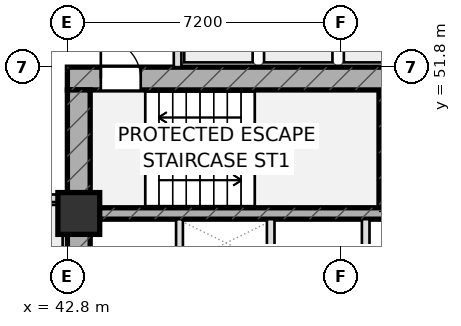
"""IFC4 building model, lengths in metres.
Left out: names, types, materials, properties, quantities, classifications, styles, units other than length and angle.
Written with IfcOpenShell. Run it as: python <this file> out.ifc"""

import sys

from ifc_helpers import new_model, si_unit, direction, frame, frame_2d, origin, origin_2d, place, context, subcontext, project, spatial, rectangle, extrude, element, fill, save


model = new_model("IFC4")
c1 = context("Model", 3, precision=1e-05, world=origin(), true_north=direction((0.0, 1.0)))
c2 = subcontext(c1, "Body", "Model", "MODEL_VIEW")
j1 = project(units=[si_unit("LENGTHUNIT", "METRE"), si_unit("PLANEANGLEUNIT", "RADIAN")], contexts=[c1])
p1 = place(None, origin())
s1 = spatial("IfcSite", under=j1, at=p1, CompositionType="ELEMENT")
p2 = place(p1, origin())
s2 = spatial("IfcBuilding", under=s1, at=p2, CompositionType="ELEMENT")
p3 = place(p2, origin())
s3 = spatial("IfcBuildingStorey", under=s2, at=p3, CompositionType="ELEMENT", Elevation=0.0)
p4 = place(p3, frame((51.11, 48.1, 0.0), z_axis=(0.0, 0.0, 1.0), x_axis=(0.0, 1.0, 0.0)))
e1 = element("IfcWall", 1, at=p4, inside=s3, PredefinedType="SHEAR", context=c2, shape_type="SweptSolid", body=[
    extrude(rectangle(XDim=3.1, YDim=0.22, at=frame_2d((1.55, 0.0))), origin(), (0.0, 0.0, 1.0), 5.45),
])
p5 = place(p3, frame((42.8, 51.5, 0.0), z_axis=(0.0, 0.0, 1.0), x_axis=(1.0, 0.0, 0.0)))
e2 = element("IfcWall", 2, at=p5, inside=s3, PredefinedType="SHEAR", context=c2, shape_type="SweptSolid", body=[
    extrude(rectangle(XDim=14.4, YDim=0.6, at=frame_2d((7.2, 0.0))), origin(), (0.0, 0.0, 1.0), 5.45),
])
p6 = place(p5, frame((0.88, 0.0, 0.0)))
e3 = element("IfcOpeningElement", 3, at=p6, cuts=e2, PredefinedType="OPENING", context=c2, shape_type="SweptSolid", body=[
    extrude(rectangle(XDim=1.05, YDim=2.2, at=frame_2d((0.525, 1.1))), frame((0.0, 0.31, 0.0), z_axis=(0.0, -1.0, 0.0), x_axis=(1.0, 0.0, 0.0)), (0.0, 0.0, 1.0), 0.62),
])
p7 = place(p3, frame((43.1, 38.8, 0.0), z_axis=(0.0, 0.0, 1.0), x_axis=(0.0, 1.0, 0.0)))
e4 = element("IfcWall", 4, at=p7, inside=s3, PredefinedType="SHEAR", context=c2, shape_type="SweptSolid", body=[
    extrude(rectangle(XDim=12.4, YDim=0.6, at=frame_2d((6.2, 0.0))), origin(), (0.0, 0.0, 1.0), 5.45),
])
p8 = place(p3, frame((43.4, 47.95, 0.0), z_axis=(0.0, 0.0, 1.0), x_axis=(1.0, 0.0, 0.0)))
e5 = element("IfcWall", 5, at=p8, inside=s3, PredefinedType="SHEAR", context=c2, shape_type="SweptSolid", body=[
    extrude(rectangle(XDim=13.2, YDim=0.3, at=frame_2d((6.6, 0.0))), origin(), (0.0, 0.0, 1.0), 5.45),
])
p9 = place(p8, frame((8.345, 0.0, 0.0)))
e6 = element("IfcOpeningElement", 6, at=p9, cuts=e5, PredefinedType="OPENING", context=c2, shape_type="SweptSolid", body=[
    extrude(rectangle(XDim=1.15, YDim=2.2, at=frame_2d((0.575, 1.1))), frame((0.0, 0.16, 0.0), z_axis=(0.0, -1.0, 0.0), x_axis=(1.0, 0.0, 0.0)), (0.0, 0.0, 1.0), 0.32),
])
p10 = place(p8, frame((10.065, 0.0, 0.0)))
e7 = element("IfcOpeningElement", 7, at=p10, cuts=e5, PredefinedType="OPENING", context=c2, shape_type="SweptSolid", body=[
    extrude(rectangle(XDim=1.15, YDim=2.2, at=frame_2d((0.575, 1.1))), frame((0.0, 0.16, 0.0), z_axis=(0.0, -1.0, 0.0), x_axis=(1.0, 0.0, 0.0)), (0.0, 0.0, 1.0), 0.32),
])
p11 = place(p8, frame((11.645, 0.0, 0.0)))
e8 = element("IfcOpeningElement", 8, at=p11, cuts=e5, PredefinedType="OPENING", context=c2, shape_type="SweptSolid", body=[
    extrude(rectangle(XDim=1.15, YDim=2.2, at=frame_2d((0.575, 1.1))), frame((0.0, 0.16, 0.0), z_axis=(0.0, -1.0, 0.0), x_axis=(1.0, 0.0, 0.0)), (0.0, 0.0, 1.0), 0.32),
])
p12 = place(p3, frame((43.1, 47.95, 0.0), z_axis=(0.0, 0.0, 1.0), x_axis=(1.0, 0.0, 0.0)))
e9 = element("IfcColumn", 9, at=p12, inside=s3, PredefinedType="COLUMN", context=c2, shape_type="SweptSolid", body=[
    extrude(rectangle(XDim=1.1, YDim=1.1, at=origin_2d()), origin(), (0.0, 0.0, 1.0), 5.45),
])
for number, where, z_axis, x_axis in (
    (10, (40.3, 48.35, 0.0), (0.0, 0.0, 1.0), (1.0, 0.0, 0.0)),
    (11, (45.7, 51.8, 0.0), (0.0, 0.0, 1.0), (0.0, 1.0, 0.0)),
):
    element("IfcWall", number, at=place(p3, frame(where, z_axis=z_axis, x_axis=x_axis)), inside=s3, PredefinedType="PARTITIONING", context=c2, shape_type="SweptSolid", body=[
        extrude(rectangle(XDim=2.5, YDim=0.2, at=frame_2d((1.25, 0.0))), origin(), (0.0, 0.0, 1.0), 5.45),
    ])
p13 = place(p3, frame((48.15, 46.55, 0.0), z_axis=(0.0, 0.0, 1.0), x_axis=(0.0, 1.0, 0.0)))
e12 = element("IfcWall", 12, at=p13, inside=s3, PredefinedType="PARTITIONING", context=c2, shape_type="SweptSolid", body=[
    extrude(rectangle(XDim=1.25, YDim=0.2, at=frame_2d((0.625, 0.0))), origin(), (0.0, 0.0, 1.0), 5.45),
])
p14 = place(p3, frame((50.65, 45.05, 0.0), z_axis=(0.0, 0.0, 1.0), x_axis=(0.0, 1.0, 0.0)))
e13 = element("IfcWall", 13, at=p14, inside=s3, PredefinedType="PARTITIONING", context=c2, shape_type="SweptSolid", body=[
    extrude(rectangle(XDim=2.75, YDim=0.2, at=frame_2d((1.375, 0.0))), origin(), (0.0, 0.0, 1.0), 5.45),
])
p15 = place(p3, frame((45.75, 42.2, 0.0), z_axis=(0.0, 0.0, 1.0), x_axis=(0.0, 1.0, 0.0)))
e14 = element("IfcWall", 14, at=p15, inside=s3, PredefinedType="PARTITIONING", context=c2, shape_type="SweptSolid", body=[
    extrude(rectangle(XDim=5.6, YDim=0.18, at=frame_2d((2.8, 0.0))), origin(), (0.0, 0.0, 1.0), 5.45),
])
p16 = place(p15, frame((0.55, 0.0, 0.0)))
e15 = element("IfcOpeningElement", 15, at=p16, cuts=e14, PredefinedType="OPENING", context=c2, shape_type="SweptSolid", body=[
    extrude(rectangle(XDim=0.9, YDim=2.05, at=frame_2d((0.45, 1.025))), frame((0.0, 0.1, 0.0), z_axis=(0.0, -1.0, 0.0), x_axis=(1.0, 0.0, 0.0)), (0.0, 0.0, 1.0), 0.2),
])
p17 = place(p15, frame((2.9, 0.0, 0.0)))
e16 = element("IfcOpeningElement", 16, at=p17, cuts=e14, PredefinedType="OPENING", context=c2, shape_type="SweptSolid", body=[
    extrude(rectangle(XDim=0.85, YDim=2.05, at=frame_2d((0.425, 1.025))), frame((0.0, 0.1, 0.0), z_axis=(0.0, -1.0, 0.0), x_axis=(1.0, 0.0, 0.0)), (0.0, 0.0, 1.0), 0.2),
])
p18 = place(p6, origin())
e17 = element("IfcDoor", 17, at=p18, inside=s3, OperationType="SINGLE_SWING_LEFT", PredefinedType="DOOR", context=c2, shape_type="SweptSolid", body=[
    extrude(rectangle(XDim=1.05, YDim=2.2, at=frame_2d((0.525, 1.1))), frame((0.0, 0.025, 0.0), z_axis=(0.0, -1.0, 0.0), x_axis=(1.0, 0.0, 0.0)), (0.0, 0.0, 1.0), 0.05),
])
fill(e3, e17)
save(model, sys.argv[1])
